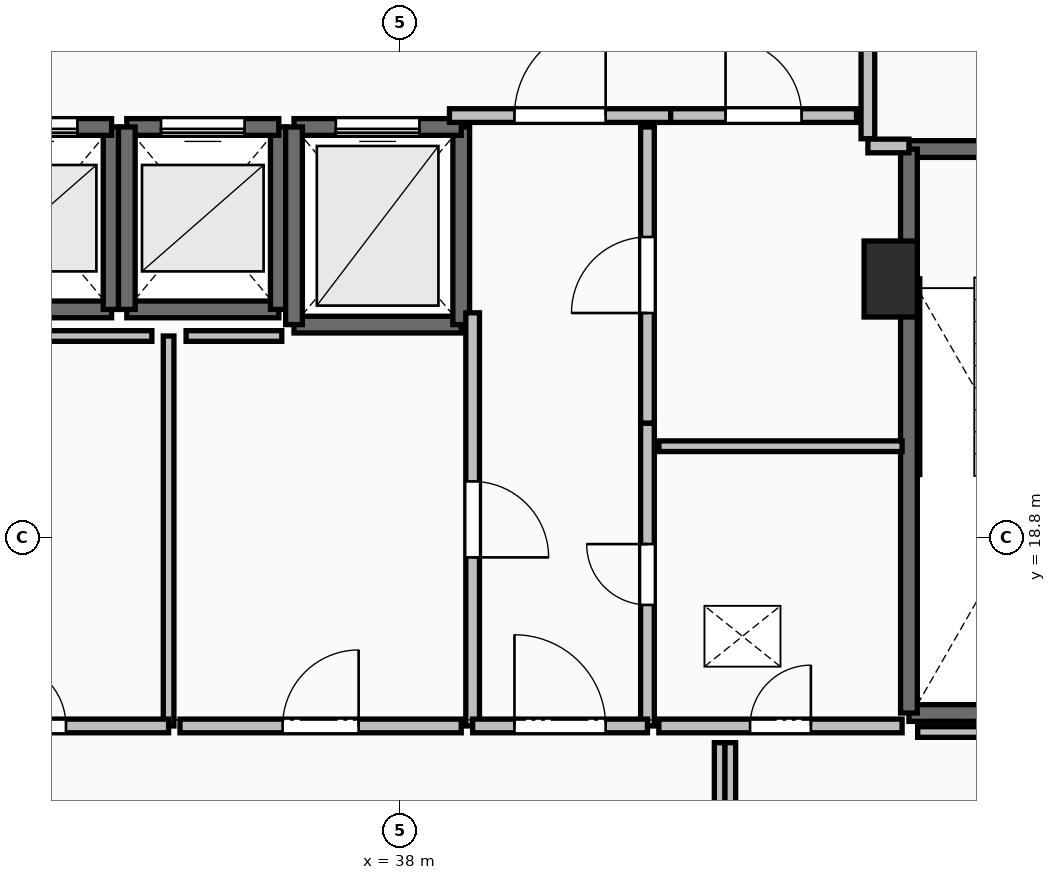
"""IFC4 building model, lengths in metres.
Left out: names, types, materials, properties, quantities, classifications, styles, units other than length and angle.
Written with IfcOpenShell. Run it as: python <this file> out.ifc"""

import sys

from ifc_helpers import new_model, si_unit, direction, frame, frame_2d, origin, origin_2d, place, context, subcontext, project, spatial, rectangle, extrude, element, fill, save


model = new_model("IFC4")
c1 = context("Model", 3, precision=1e-05, world=origin(), true_north=direction((0.0, 1.0)))
c2 = subcontext(c1, "Body", "Model", "MODEL_VIEW")
j1 = project(units=[si_unit("LENGTHUNIT", "METRE"), si_unit("PLANEANGLEUNIT", "RADIAN")], contexts=[c1])
p1 = place(None, origin())
s1 = spatial("IfcSite", under=j1, at=p1, CompositionType="ELEMENT")
p2 = place(p1, origin())
s2 = spatial("IfcBuilding", under=s1, at=p2, CompositionType="ELEMENT")
p3 = place(p2, frame((0.0, 0.0, 186.1)))
s3 = spatial("IfcBuildingStorey", under=s2, at=p3, CompositionType="ELEMENT", Elevation=186.1)
p4 = place(p3, frame((44.45, 22.2, 0.0), z_axis=(0.0, 0.0, 1.0), x_axis=(1.0, 0.0, 0.0)))
e1 = element("IfcColumn", 1, at=p4, inside=s3, PredefinedType="PILASTER", context=c2, shape_type="SweptSolid", body=[
    extrude(rectangle(XDim=0.7, YDim=1.0, at=origin_2d()), origin(), (0.0, 0.0, 1.0), 3.5),
])
p5 = place(p3, frame((44.69, 23.91, 0.0), z_axis=(0.0, 0.0, 1.0), x_axis=(1.0, 0.0, 0.0)))
e2 = element("IfcWall", 2, at=p5, inside=s3, PredefinedType="SOLIDWALL", context=c2, shape_type="SweptSolid", body=[
    extrude(rectangle(XDim=3.37, YDim=0.22, at=frame_2d((1.685, 0.0))), origin(), (0.0, 0.0, 1.0), 3.24),
])
p6 = place(p5, frame((1.135, 0.0, 0.0)))
e3 = element("IfcOpeningElement", 3, at=p6, cuts=e2, PredefinedType="OPENING", context=c2, shape_type="SweptSolid", body=[
    extrude(rectangle(XDim=1.1, YDim=2.15, at=frame_2d((0.55, 1.075))), frame((0.0, 0.125, 0.0), z_axis=(0.0, -1.0, 0.0), x_axis=(1.0, 0.0, 0.0)), (0.0, 0.0, 1.0), 0.25),
])
p7 = place(p3, frame((48.06, 16.49, 0.0), z_axis=(0.0, 0.0, 1.0), x_axis=(-1.0, 0.0, 0.0)))
e4 = element("IfcWall", 4, at=p7, inside=s3, PredefinedType="SOLIDWALL", context=c2, shape_type="SweptSolid", body=[
    extrude(rectangle(XDim=3.37, YDim=0.22, at=frame_2d((1.685, 0.0))), origin(), (0.0, 0.0, 1.0), 3.24),
])
p8 = place(p3, frame((44.69, 16.49, 0.0), z_axis=(0.0, 0.0, 1.0), x_axis=(0.0, 1.0, 0.0)))
e5 = element("IfcWall", 5, at=p8, inside=s3, PredefinedType="SOLIDWALL", context=c2, shape_type="SweptSolid", body=[
    extrude(rectangle(XDim=7.42, YDim=0.22, at=frame_2d((3.71, 0.0))), origin(), (0.0, 0.0, 1.0), 3.24),
])
p9 = place(p3, frame((32.2, 21.8, 0.0), z_axis=(0.0, 0.0, 1.0), x_axis=(1.0, 0.0, 0.0)))
e6 = element("IfcWall", 6, at=p9, inside=s3, PredefinedType="SOLIDWALL", context=c2, shape_type="SweptSolid", body=[
    extrude(rectangle(XDim=2.0, YDim=0.22, at=frame_2d((1.0, 0.0))), origin(), (0.0, 0.0, 1.0), 3.24),
])
p10 = place(p3, frame((34.2, 21.8, 0.0), z_axis=(0.0, 0.0, 1.0), x_axis=(0.0, 1.0, 0.0)))
e7 = element("IfcWall", 7, at=p10, inside=s3, PredefinedType="SOLIDWALL", context=c2, shape_type="SweptSolid", body=[
    extrude(rectangle(XDim=2.4, YDim=0.22, at=frame_2d((1.2, 0.0))), origin(), (0.0, 0.0, 1.0), 3.24),
])
p11 = place(p3, frame((34.2, 24.2, 0.0), z_axis=(0.0, 0.0, 1.0), x_axis=(-1.0, 0.0, 0.0)))
e8 = element("IfcWall", 8, at=p11, inside=s3, PredefinedType="SOLIDWALL", context=c2, shape_type="SweptSolid", body=[
    extrude(rectangle(XDim=2.0, YDim=0.22, at=frame_2d((1.0, 0.0))), origin(), (0.0, 0.0, 1.0), 3.24),
])
p12 = place(p11, frame((0.45, 0.0, 0.0)))
e9 = element("IfcOpeningElement", 9, at=p12, cuts=e8, PredefinedType="OPENING", context=c2, shape_type="SweptSolid", body=[
    extrude(rectangle(XDim=1.1, YDim=2.2, at=frame_2d((0.55, 1.1))), frame((0.0, 0.125, 0.0), z_axis=(0.0, -1.0, 0.0), x_axis=(1.0, 0.0, 0.0)), (0.0, 0.0, 1.0), 0.25),
])
p13 = place(p3, frame((34.4, 21.8, 0.0), z_axis=(0.0, 0.0, 1.0), x_axis=(1.0, 0.0, 0.0)))
e10 = element("IfcWall", 10, at=p13, inside=s3, PredefinedType="SOLIDWALL", context=c2, shape_type="SweptSolid", body=[
    extrude(rectangle(XDim=2.0, YDim=0.22, at=frame_2d((1.0, 0.0))), origin(), (0.0, 0.0, 1.0), 3.24),
])
p14 = place(p3, frame((36.4, 21.8, 0.0), z_axis=(0.0, 0.0, 1.0), x_axis=(0.0, 1.0, 0.0)))
e11 = element("IfcWall", 11, at=p14, inside=s3, PredefinedType="SOLIDWALL", context=c2, shape_type="SweptSolid", body=[
    extrude(rectangle(XDim=2.4, YDim=0.22, at=frame_2d((1.2, 0.0))), origin(), (0.0, 0.0, 1.0), 3.24),
])
p15 = place(p3, frame((36.4, 24.2, 0.0), z_axis=(0.0, 0.0, 1.0), x_axis=(-1.0, 0.0, 0.0)))
e12 = element("IfcWall", 12, at=p15, inside=s3, PredefinedType="SOLIDWALL", context=c2, shape_type="SweptSolid", body=[
    extrude(rectangle(XDim=2.0, YDim=0.22, at=frame_2d((1.0, 0.0))), origin(), (0.0, 0.0, 1.0), 3.24),
])
p16 = place(p15, frame((0.45, 0.0, 0.0)))
e13 = element("IfcOpeningElement", 13, at=p16, cuts=e12, PredefinedType="OPENING", context=c2, shape_type="SweptSolid", body=[
    extrude(rectangle(XDim=1.1, YDim=2.2, at=frame_2d((0.55, 1.1))), frame((0.0, 0.125, 0.0), z_axis=(0.0, -1.0, 0.0), x_axis=(1.0, 0.0, 0.0)), (0.0, 0.0, 1.0), 0.25),
])
p17 = place(p3, frame((34.4, 24.2, 0.0), z_axis=(0.0, 0.0, 1.0), x_axis=(0.0, -1.0, 0.0)))
e14 = element("IfcWall", 14, at=p17, inside=s3, PredefinedType="SOLIDWALL", context=c2, shape_type="SweptSolid", body=[
    extrude(rectangle(XDim=2.4, YDim=0.22, at=frame_2d((1.2, 0.0))), origin(), (0.0, 0.0, 1.0), 3.24),
])
p18 = place(p3, frame((36.6, 21.6, 0.0), z_axis=(0.0, 0.0, 1.0), x_axis=(1.0, 0.0, 0.0)))
e15 = element("IfcWall", 15, at=p18, inside=s3, PredefinedType="SOLIDWALL", context=c2, shape_type="SweptSolid", body=[
    extrude(rectangle(XDim=2.2, YDim=0.22, at=frame_2d((1.1, 0.0))), origin(), (0.0, 0.0, 1.0), 3.24),
])
p19 = place(p3, frame((38.8, 21.6, 0.0), z_axis=(0.0, 0.0, 1.0), x_axis=(0.0, 1.0, 0.0)))
e16 = element("IfcWall", 16, at=p19, inside=s3, PredefinedType="SOLIDWALL", context=c2, shape_type="SweptSolid", body=[
    extrude(rectangle(XDim=2.6, YDim=0.22, at=frame_2d((1.3, 0.0))), origin(), (0.0, 0.0, 1.0), 3.24),
])
p20 = place(p3, frame((38.8, 24.2, 0.0), z_axis=(0.0, 0.0, 1.0), x_axis=(-1.0, 0.0, 0.0)))
e17 = element("IfcWall", 17, at=p20, inside=s3, PredefinedType="SOLIDWALL", context=c2, shape_type="SweptSolid", body=[
    extrude(rectangle(XDim=2.2, YDim=0.22, at=frame_2d((1.1, 0.0))), origin(), (0.0, 0.0, 1.0), 3.24),
])
p21 = place(p20, frame((0.55, 0.0, 0.0)))
e18 = element("IfcOpeningElement", 18, at=p21, cuts=e17, PredefinedType="OPENING", context=c2, shape_type="SweptSolid", body=[
    extrude(rectangle(XDim=1.1, YDim=2.2, at=frame_2d((0.55, 1.1))), frame((0.0, 0.125, 0.0), z_axis=(0.0, -1.0, 0.0), x_axis=(1.0, 0.0, 0.0)), (0.0, 0.0, 1.0), 0.25),
])
p22 = place(p3, frame((36.6, 24.2, 0.0), z_axis=(0.0, 0.0, 1.0), x_axis=(0.0, -1.0, 0.0)))
e19 = element("IfcWall", 19, at=p22, inside=s3, PredefinedType="SOLIDWALL", context=c2, shape_type="SweptSolid", body=[
    extrude(rectangle(XDim=2.6, YDim=0.22, at=frame_2d((1.3, 0.0))), origin(), (0.0, 0.0, 1.0), 3.24),
])
p23 = place(p3, frame((44.15, 27.955, 0.0), z_axis=(0.0, 0.0, 1.0), x_axis=(0.0, -1.0, 0.0)))
e20 = element("IfcWall", 20, at=p23, inside=s3, PredefinedType="PARTITIONING", context=c2, shape_type="SweptSolid", body=[
    extrude(rectangle(XDim=3.91, YDim=0.18, at=frame_2d((1.955, 0.0))), origin(), (0.0, 0.0, 1.0), 3.24),
])
p24 = place(p23, frame((1.355, 0.0, 0.0)))
e21 = element("IfcOpeningElement", 21, at=p24, cuts=e20, PredefinedType="OPENING", context=c2, shape_type="SweptSolid", body=[
    extrude(rectangle(XDim=1.2, YDim=2.15, at=frame_2d((0.6, 1.075))), frame((0.0, 0.105, 0.0), z_axis=(0.0, -1.0, 0.0), x_axis=(1.0, 0.0, 0.0)), (0.0, 0.0, 1.0), 0.21),
])
p25 = place(p3, frame((44.15, 23.95, 0.0), z_axis=(0.0, 0.0, 1.0), x_axis=(1.0, 0.0, 0.0)))
e22 = element("IfcWall", 22, at=p25, inside=s3, PredefinedType="PARTITIONING", context=c2, shape_type="SweptSolid", body=[
    extrude(rectangle(XDim=0.54, YDim=0.18, at=frame_2d((0.27, 0.0))), origin(), (0.0, 0.0, 1.0), 3.24),
])
p26 = place(p3, frame((38.645, 24.35, 0.0), z_axis=(0.0, 0.0, 1.0), x_axis=(1.0, 0.0, 0.0)))
e23 = element("IfcWall", 23, at=p26, inside=s3, PredefinedType="PARTITIONING", context=c2, shape_type="SweptSolid", body=[
    extrude(rectangle(XDim=2.91, YDim=0.18, at=frame_2d((1.455, 0.0))), origin(), (0.0, 0.0, 1.0), 3.24),
])
p27 = place(p26, frame((0.855, 0.0, 0.0)))
e24 = element("IfcOpeningElement", 24, at=p27, cuts=e23, PredefinedType="OPENING", context=c2, shape_type="SweptSolid", body=[
    extrude(rectangle(XDim=1.2, YDim=2.15, at=frame_2d((0.6, 1.075))), frame((0.0, 0.105, 0.0), z_axis=(0.0, -1.0, 0.0), x_axis=(1.0, 0.0, 0.0)), (0.0, 0.0, 1.0), 0.21),
])
p28 = place(p3, frame((41.555, 24.35, 0.0), z_axis=(0.0, 0.0, 1.0), x_axis=(1.0, 0.0, 0.0)))
e25 = element("IfcWall", 25, at=p28, inside=s3, PredefinedType="PARTITIONING", context=c2, shape_type="SweptSolid", body=[
    extrude(rectangle(XDim=2.445, YDim=0.18, at=frame_2d((1.223, 0.0))), origin(), (0.0, 0.0, 1.0), 3.24),
])
p29 = place(p28, frame((0.722, 0.0, 0.0)))
e26 = element("IfcOpeningElement", 26, at=p29, cuts=e25, PredefinedType="OPENING", context=c2, shape_type="SweptSolid", body=[
    extrude(rectangle(XDim=1.0, YDim=2.15, at=frame_2d((0.5, 1.075))), frame((0.0, 0.105, 0.0), z_axis=(0.0, -1.0, 0.0), x_axis=(1.0, 0.0, 0.0)), (0.0, 0.0, 1.0), 0.21),
])
p30 = place(p3, frame((41.25, 16.32, 0.0), z_axis=(0.0, 0.0, 1.0), x_axis=(0.0, 1.0, 0.0)))
e27 = element("IfcWall", 27, at=p30, inside=s3, PredefinedType="PARTITIONING", context=c2, shape_type="SweptSolid", body=[
    extrude(rectangle(XDim=3.985, YDim=0.18, at=frame_2d((1.992, 0.0))), origin(), (0.0, 0.0, 1.0), 3.24),
])
p31 = place(p30, frame((1.593, 0.0, 0.0)))
e28 = element("IfcOpeningElement", 28, at=p31, cuts=e27, PredefinedType="OPENING", context=c2, shape_type="SweptSolid", body=[
    extrude(rectangle(XDim=0.8, YDim=2.05, at=frame_2d((0.4, 1.025))), frame((0.0, 0.105, 0.0), z_axis=(0.0, -1.0, 0.0), x_axis=(1.0, 0.0, 0.0)), (0.0, 0.0, 1.0), 0.21),
])
p32 = place(p3, frame((41.25, 20.305, 0.0), z_axis=(0.0, 0.0, 1.0), x_axis=(0.0, 1.0, 0.0)))
e29 = element("IfcWall", 29, at=p32, inside=s3, PredefinedType="PARTITIONING", context=c2, shape_type="SweptSolid", body=[
    extrude(rectangle(XDim=3.895, YDim=0.18, at=frame_2d((1.948, 0.0))), origin(), (0.0, 0.0, 1.0), 3.24),
])
p33 = place(p32, frame((1.448, 0.0, 0.0)))
e30 = element("IfcOpeningElement", 30, at=p33, cuts=e29, PredefinedType="OPENING", context=c2, shape_type="SweptSolid", body=[
    extrude(rectangle(XDim=1.0, YDim=2.15, at=frame_2d((0.5, 1.075))), frame((0.0, 0.105, 0.0), z_axis=(0.0, -1.0, 0.0), x_axis=(1.0, 0.0, 0.0)), (0.0, 0.0, 1.0), 0.21),
])
p34 = place(p3, frame((38.95, 21.755, 0.0), z_axis=(0.0, 0.0, 1.0), x_axis=(0.0, -1.0, 0.0)))
e31 = element("IfcWall", 31, at=p34, inside=s3, PredefinedType="PARTITIONING", context=c2, shape_type="SweptSolid", body=[
    extrude(rectangle(XDim=5.435, YDim=0.18, at=frame_2d((2.717, 0.0))), origin(), (0.0, 0.0, 1.0), 3.24),
])
p35 = place(p34, frame((2.218, 0.0, 0.0)))
e32 = element("IfcOpeningElement", 32, at=p35, cuts=e31, PredefinedType="OPENING", context=c2, shape_type="SweptSolid", body=[
    extrude(rectangle(XDim=1.0, YDim=2.15, at=frame_2d((0.5, 1.075))), frame((0.0, 0.105, 0.0), z_axis=(0.0, -1.0, 0.0), x_axis=(1.0, 0.0, 0.0)), (0.0, 0.0, 1.0), 0.21),
])
p36 = place(p3, frame((38.95, 16.32, 0.0), z_axis=(0.0, 0.0, 1.0), x_axis=(1.0, 0.0, 0.0)))
e33 = element("IfcWall", 33, at=p36, inside=s3, PredefinedType="PARTITIONING", context=c2, shape_type="SweptSolid", body=[
    extrude(rectangle(XDim=2.3, YDim=0.18, at=frame_2d((1.15, 0.0))), origin(), (0.0, 0.0, 1.0), 3.24),
])
p37 = place(p36, frame((0.55, 0.0, 0.0)))
e34 = element("IfcOpeningElement", 34, at=p37, cuts=e33, PredefinedType="OPENING", context=c2, shape_type="SweptSolid", body=[
    extrude(rectangle(XDim=1.2, YDim=2.15, at=frame_2d((0.6, 1.075))), frame((0.0, 0.105, 0.0), z_axis=(0.0, -1.0, 0.0), x_axis=(1.0, 0.0, 0.0)), (0.0, 0.0, 1.0), 0.21),
])
p38 = place(p3, frame((44.6, 20.0, 0.0), z_axis=(0.0, 0.0, 1.0), x_axis=(-1.0, 0.0, 0.0)))
e35 = element("IfcWall", 35, at=p38, inside=s3, PredefinedType="PARTITIONING", context=c2, shape_type="SweptSolid", body=[
    extrude(rectangle(XDim=3.2, YDim=0.14, at=frame_2d((1.6, 0.0))), origin(), (0.0, 0.0, 1.0), 3.24),
])
p39 = place(p3, frame((41.4, 16.32, 0.0), z_axis=(0.0, 0.0, 1.0), x_axis=(1.0, 0.0, 0.0)))
e36 = element("IfcWall", 36, at=p39, inside=s3, PredefinedType="PARTITIONING", context=c2, shape_type="SweptSolid", body=[
    extrude(rectangle(XDim=3.2, YDim=0.18, at=frame_2d((1.6, 0.0))), origin(), (0.0, 0.0, 1.0), 3.24),
])
p40 = place(p39, frame((1.2, 0.0, 0.0)))
e37 = element("IfcOpeningElement", 37, at=p40, cuts=e36, PredefinedType="OPENING", context=c2, shape_type="SweptSolid", body=[
    extrude(rectangle(XDim=0.8, YDim=2.05, at=frame_2d((0.4, 1.025))), frame((0.0, 0.105, 0.0), z_axis=(0.0, -1.0, 0.0), x_axis=(1.0, 0.0, 0.0)), (0.0, 0.0, 1.0), 0.21),
])
p41 = place(p3, frame((34.95, 16.32, 0.0), z_axis=(0.0, 0.0, 1.0), x_axis=(0.0, 1.0, 0.0)))
e38 = element("IfcWall", 38, at=p41, inside=s3, PredefinedType="PARTITIONING", context=c2, shape_type="SweptSolid", body=[
    extrude(rectangle(XDim=5.13, YDim=0.14, at=frame_2d((2.565, 0.0))), origin(), (0.0, 0.0, 1.0), 3.24),
])
p42 = place(p3, frame((31.4, 16.32, 0.0), z_axis=(0.0, 0.0, 1.0), x_axis=(1.0, 0.0, 0.0)))
e39 = element("IfcWall", 39, at=p42, inside=s3, PredefinedType="PARTITIONING", context=c2, shape_type="SweptSolid", body=[
    extrude(rectangle(XDim=3.55, YDim=0.18, at=frame_2d((1.775, 0.0))), origin(), (0.0, 0.0, 1.0), 3.24),
])
p43 = place(p42, frame((1.35, 0.0, 0.0)))
e40 = element("IfcOpeningElement", 40, at=p43, cuts=e39, PredefinedType="OPENING", context=c2, shape_type="SweptSolid", body=[
    extrude(rectangle(XDim=0.85, YDim=2.1, at=frame_2d((0.425, 1.05))), frame((0.0, 0.105, 0.0), z_axis=(0.0, -1.0, 0.0), x_axis=(1.0, 0.0, 0.0)), (0.0, 0.0, 1.0), 0.21),
])
p44 = place(p3, frame((35.1, 16.32, 0.0), z_axis=(0.0, 0.0, 1.0), x_axis=(1.0, 0.0, 0.0)))
e41 = element("IfcWall", 41, at=p44, inside=s3, PredefinedType="PARTITIONING", context=c2, shape_type="SweptSolid", body=[
    extrude(rectangle(XDim=3.7, YDim=0.18, at=frame_2d((1.85, 0.0))), origin(), (0.0, 0.0, 1.0), 3.24),
])
p45 = place(p44, frame((1.35, 0.0, 0.0)))
e42 = element("IfcOpeningElement", 42, at=p45, cuts=e41, PredefinedType="OPENING", context=c2, shape_type="SweptSolid", body=[
    extrude(rectangle(XDim=1.0, YDim=2.15, at=frame_2d((0.5, 1.075))), frame((0.0, 0.105, 0.0), z_axis=(0.0, -1.0, 0.0), x_axis=(1.0, 0.0, 0.0)), (0.0, 0.0, 1.0), 0.21),
])
p46 = place(p3, frame((34.73, 21.45, 0.0), z_axis=(0.0, 0.0, 1.0), x_axis=(-1.0, 0.0, 0.0)))
e43 = element("IfcWall", 43, at=p46, inside=s3, PredefinedType="PARTITIONING", context=c2, shape_type="SweptSolid", body=[
    extrude(rectangle(XDim=3.2, YDim=0.14, at=frame_2d((1.6, 0.0))), origin(), (0.0, 0.0, 1.0), 3.24),
])
p47 = place(p3, frame((36.439, 21.45, 0.0), z_axis=(0.0, 0.0, 1.0), x_axis=(-1.0, 0.0, 0.0)))
e44 = element("IfcWall", 44, at=p47, inside=s3, PredefinedType="PARTITIONING", context=c2, shape_type="SweptSolid", body=[
    extrude(rectangle(XDim=1.259, YDim=0.14, at=frame_2d((0.629, 0.0))), origin(), (0.0, 0.0, 1.0), 3.24),
])
for number, where, z_axis, x_axis in (
    (45, (42.2, 16.1, 0.0), (0.0, 0.0, 1.0), (0.0, -1.0, 0.0)),
    (46, (42.34, 14.27, 0.0), (0.0, 0.0, 1.0), (0.0, 1.0, 0.0)),
):
    element("IfcWall", number, at=place(p3, frame(where, z_axis=z_axis, x_axis=x_axis)), inside=s3, PredefinedType="PARTITIONING", context=c2, shape_type="SweptSolid", body=[
        extrude(rectangle(XDim=1.83, YDim=0.14, at=frame_2d((0.915, 0.0))), origin(), (0.0, 0.0, 1.0), 2.922),
    ])
p48 = place(p3, frame((44.805, 16.24, 0.0), z_axis=(0.0, 0.0, 1.0), x_axis=(1.0, 0.0, 0.0)))
e47 = element("IfcWall", 47, at=p48, inside=s3, PredefinedType="PARTITIONING", context=c2, shape_type="SweptSolid", body=[
    extrude(rectangle(XDim=3.745, YDim=0.14, at=frame_2d((1.873, 0.0))), origin(), (0.0, 0.0, 1.0), 2.432),
])
p49 = place(p12, origin())
e48 = element("IfcDoor", 48, at=p49, inside=s3, OperationType="SLIDING_TO_LEFT", PredefinedType="DOOR", context=c2, shape_type="SweptSolid", body=[
    extrude(rectangle(XDim=1.1, YDim=2.2, at=frame_2d((0.55, 1.1))), frame((0.0, 0.025, 0.0), z_axis=(0.0, -1.0, 0.0), x_axis=(1.0, 0.0, 0.0)), (0.0, 0.0, 1.0), 0.05),
])
fill(e9, e48)
p50 = place(p16, origin())
e49 = element("IfcDoor", 49, at=p50, inside=s3, OperationType="SLIDING_TO_LEFT", PredefinedType="DOOR", context=c2, shape_type="SweptSolid", body=[
    extrude(rectangle(XDim=1.1, YDim=2.2, at=frame_2d((0.55, 1.1))), frame((0.0, 0.025, 0.0), z_axis=(0.0, -1.0, 0.0), x_axis=(1.0, 0.0, 0.0)), (0.0, 0.0, 1.0), 0.05),
])
fill(e13, e49)
p51 = place(p21, origin())
e50 = element("IfcDoor", 50, at=p51, inside=s3, OperationType="SLIDING_TO_LEFT", PredefinedType="DOOR", context=c2, shape_type="SweptSolid", body=[
    extrude(rectangle(XDim=1.1, YDim=2.2, at=frame_2d((0.55, 1.1))), frame((0.0, 0.025, 0.0), z_axis=(0.0, -1.0, 0.0), x_axis=(1.0, 0.0, 0.0)), (0.0, 0.0, 1.0), 0.05),
])
fill(e18, e50)
p52 = place(p27, origin())
e51 = element("IfcDoor", 51, at=p52, inside=s3, OperationType="SINGLE_SWING_RIGHT", PredefinedType="DOOR", context=c2, shape_type="SweptSolid", body=[
    extrude(rectangle(XDim=1.2, YDim=2.15, at=frame_2d((0.6, 1.075))), frame((0.0, 0.025, 0.0), z_axis=(0.0, -1.0, 0.0), x_axis=(1.0, 0.0, 0.0)), (0.0, 0.0, 1.0), 0.05),
])
fill(e24, e51)
p53 = place(p29, origin())
e52 = element("IfcDoor", 52, at=p53, inside=s3, OperationType="SINGLE_SWING_LEFT", PredefinedType="DOOR", context=c2, shape_type="SweptSolid", body=[
    extrude(rectangle(XDim=1.0, YDim=2.15, at=frame_2d((0.5, 1.075))), frame((0.0, 0.025, 0.0), z_axis=(0.0, -1.0, 0.0), x_axis=(1.0, 0.0, 0.0)), (0.0, 0.0, 1.0), 0.05),
])
fill(e26, e52)
p54 = place(p31, origin())
e53 = element("IfcDoor", 53, at=p54, inside=s3, OperationType="SINGLE_SWING_RIGHT", PredefinedType="DOOR", context=c2, shape_type="SweptSolid", body=[
    extrude(rectangle(XDim=0.8, YDim=2.05, at=frame_2d((0.4, 1.025))), frame((0.0, 0.025, 0.0), z_axis=(0.0, -1.0, 0.0), x_axis=(1.0, 0.0, 0.0)), (0.0, 0.0, 1.0), 0.05),
])
fill(e28, e53)
p55 = place(p33, origin())
e54 = element("IfcDoor", 54, at=p55, inside=s3, OperationType="SINGLE_SWING_LEFT", PredefinedType="DOOR", context=c2, shape_type="SweptSolid", body=[
    extrude(rectangle(XDim=1.0, YDim=2.15, at=frame_2d((0.5, 1.075))), frame((0.0, 0.025, 0.0), z_axis=(0.0, -1.0, 0.0), x_axis=(1.0, 0.0, 0.0)), (0.0, 0.0, 1.0), 0.05),
])
fill(e30, e54)
p56 = place(p35, origin())
e55 = element("IfcDoor", 55, at=p56, inside=s3, OperationType="SINGLE_SWING_RIGHT", PredefinedType="DOOR", context=c2, shape_type="SweptSolid", body=[
    extrude(rectangle(XDim=1.0, YDim=2.15, at=frame_2d((0.5, 1.075))), frame((0.0, 0.025, 0.0), z_axis=(0.0, -1.0, 0.0), x_axis=(1.0, 0.0, 0.0)), (0.0, 0.0, 1.0), 0.05),
])
fill(e32, e55)
p57 = place(p37, origin())
e56 = element("IfcDoor", 56, at=p57, inside=s3, OperationType="SINGLE_SWING_LEFT", PredefinedType="DOOR", context=c2, shape_type="SweptSolid", body=[
    extrude(rectangle(XDim=1.2, YDim=2.15, at=frame_2d((0.6, 1.075))), frame((0.0, 0.025, 0.0), z_axis=(0.0, -1.0, 0.0), x_axis=(1.0, 0.0, 0.0)), (0.0, 0.0, 1.0), 0.05),
])
fill(e34, e56)
p58 = place(p40, origin())
e57 = element("IfcDoor", 57, at=p58, inside=s3, OperationType="SINGLE_SWING_RIGHT", PredefinedType="DOOR", context=c2, shape_type="SweptSolid", body=[
    extrude(rectangle(XDim=0.8, YDim=2.05, at=frame_2d((0.4, 1.025))), frame((0.0, 0.025, 0.0), z_axis=(0.0, -1.0, 0.0), x_axis=(1.0, 0.0, 0.0)), (0.0, 0.0, 1.0), 0.05),
])
fill(e37, e57)
p59 = place(p43, origin())
e58 = element("IfcDoor", 58, at=p59, inside=s3, OperationType="SINGLE_SWING_LEFT", PredefinedType="DOOR", context=c2, shape_type="SweptSolid", body=[
    extrude(rectangle(XDim=0.85, YDim=2.1, at=frame_2d((0.425, 1.05))), frame((0.0, 0.025, 0.0), z_axis=(0.0, -1.0, 0.0), x_axis=(1.0, 0.0, 0.0)), (0.0, 0.0, 1.0), 0.05),
])
fill(e40, e58)
p60 = place(p45, origin())
e59 = element("IfcDoor", 59, at=p60, inside=s3, OperationType="SINGLE_SWING_RIGHT", PredefinedType="DOOR", context=c2, shape_type="SweptSolid", body=[
    extrude(rectangle(XDim=1.0, YDim=2.15, at=frame_2d((0.5, 1.075))), frame((0.0, 0.025, 0.0), z_axis=(0.0, -1.0, 0.0), x_axis=(1.0, 0.0, 0.0)), (0.0, 0.0, 1.0), 0.05),
])
fill(e42, e59)
save(model, sys.argv[1])
